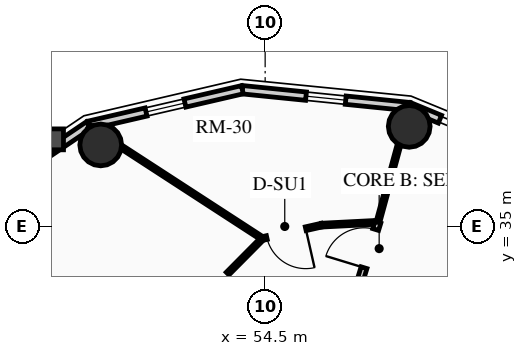
"""IFC4 building model, lengths in metres.
Left out: names, types, materials, properties, quantities, classifications, styles, units other than length and angle.
Written with IfcOpenShell. Run it as: python <this file> out.ifc"""

import sys

from ifc_helpers import new_model, si_unit, direction, frame, frame_2d, origin, origin_2d, place, context, subcontext, project, spatial, rectangle, circle, extrude, source, transform, mapped, element, fill, save


model = new_model("IFC4")
c1 = context("Model", 3, precision=1e-05, world=origin(), true_north=direction((0.0, 1.0)))
c2 = subcontext(c1, "Body", "Model", "MODEL_VIEW")
j1 = project(units=[si_unit("LENGTHUNIT", "METRE"), si_unit("PLANEANGLEUNIT", "RADIAN")], contexts=[c1])
p1 = place(None, origin())
s1 = spatial("IfcSite", under=j1, at=p1, CompositionType="ELEMENT")
p2 = place(p1, origin())
s2 = spatial("IfcBuilding", under=s1, at=p2, CompositionType="ELEMENT")
p3 = place(p2, frame((0.0, 0.0, 229.25)))
s3 = spatial("IfcBuildingStorey", under=s2, at=p3, CompositionType="ELEMENT", Elevation=229.25)
for number, where, z_axis, x_axis in (
    (1, (58.291, 37.635, 0.0), (0.0, 0.0, 1.0), (1.0, 0.0, 0.0)),
    (2, (50.173, 37.146, 0.0), (0.0, 0.0, 1.0), (1.0, 0.0, 0.0)),
):
    element("IfcColumn", number, at=place(p3, frame(where, z_axis=z_axis, x_axis=x_axis)), inside=s3, PredefinedType="USERDEFINED", context=c2, shape_type="SweptSolid", body=[
        extrude(circle(Radius=0.55, at=origin_2d()), origin(), (0.0, 0.0, 1.0), 3.2),
    ])
p4 = place(p3, frame((58.295, 38.155, 0.0), z_axis=(0.0, 0.0, 1.0), x_axis=(0.924515260676, -0.381145028536, 0.0)))
e3 = element("IfcWall", 3, at=p4, inside=s3, PredefinedType="SOLIDWALL", context=c2, shape_type="SweptSolid", body=[
    extrude(rectangle(XDim=0.87, YDim=0.22, at=frame_2d((0.435, 0.0))), origin(), (0.0, 0.0, 1.0), 2.612),
])
p5 = place(p3, frame((53.9, 38.599, 0.0), z_axis=(0.0, 0.0, 1.0), x_axis=(0.994929930991, -0.100570534541, 0.0)))
e4 = element("IfcWall", 4, at=p5, inside=s3, PredefinedType="SOLIDWALL", context=c2, shape_type="SweptSolid", body=[
    extrude(rectangle(XDim=4.418, YDim=0.22, at=frame_2d((2.209, 0.0))), origin(), (0.0, 0.0, 1.0), 2.612),
])
m1 = source(origin(), c2, "Body", "SweptSolid", [
    extrude(rectangle(XDim=1.05, YDim=1.3, at=frame_2d((0.525, 0.65))), frame((0.0, 0.12, 0.0), z_axis=(0.0, -1.0, 0.0), x_axis=(1.0, 0.0, 0.0)), (0.0, 0.0, 1.0), 0.24),
])
p6 = place(p5, frame((1.684, 0.0, 0.65)))
e5 = element("IfcOpeningElement", 5, at=p6, cuts=e4, PredefinedType="OPENING", context=c2, shape_type="MappedRepresentation", body=[
    mapped(m1, transform((0.0, 0.0, 0.0), x_axis=(1.0, 0.0, 0.0), y_axis=(0.0, 1.0, 0.0), z_axis=(0.0, 0.0, 1.0), scale=1.0)),
])
p7 = place(p3, frame((49.856, 37.663, 0.0), z_axis=(0.0, 0.0, 1.0), x_axis=(0.974249228678, 0.225473813158, 0.0)))
e6 = element("IfcWall", 6, at=p7, inside=s3, PredefinedType="SOLIDWALL", context=c2, shape_type="SweptSolid", body=[
    extrude(rectangle(XDim=4.15, YDim=0.22, at=frame_2d((2.075, 0.0))), origin(), (0.0, 0.0, 1.0), 2.612),
])
p8 = place(p7, frame((1.55, 0.0, 0.65)))
e7 = element("IfcOpeningElement", 7, at=p8, cuts=e6, PredefinedType="OPENING", context=c2, shape_type="MappedRepresentation", body=[
    mapped(m1, transform((0.0, 0.0, 0.0), x_axis=(1.0, 0.0, 0.0), y_axis=(0.0, 1.0, 0.0), z_axis=(0.0, 0.0, 1.0), scale=1.0)),
])
p9 = place(p3, frame((46.561, 35.439, 0.0), z_axis=(0.0, 0.0, 1.0), x_axis=(0.828833723692, 0.559495003079, 0.0)))
e8 = element("IfcWall", 8, at=p9, inside=s3, PredefinedType="SOLIDWALL", context=c2, shape_type="SweptSolid", body=[
    extrude(rectangle(XDim=3.976, YDim=0.22, at=frame_2d((1.988, 0.0))), origin(), (0.0, 0.0, 1.0), 2.612),
])
p10 = place(p3, frame((57.467, 35.111, 0.0), z_axis=(0.0, 0.0, 1.0), x_axis=(-0.998691757323, -0.051134859488, 0.0)))
e9 = element("IfcWall", 9, at=p10, inside=s3, PredefinedType="MOVABLE", context=c2, shape_type="SweptSolid", body=[
    extrude(rectangle(XDim=1.485, YDim=0.1, at=frame_2d((0.742, 0.0))), origin(), (0.0, 0.0, 1.0), 2.612),
])
p11 = place(p3, frame((55.984, 35.035, 0.0), z_axis=(0.0, 0.0, 1.0), x_axis=(-0.975290305708, -0.22092718165, 0.0)))
e10 = element("IfcWall", 10, at=p11, inside=s3, PredefinedType="MOVABLE", context=c2, shape_type="SweptSolid", body=[
    extrude(rectangle(XDim=1.597, YDim=0.1, at=frame_2d((0.798, 0.0))), origin(), (0.0, 0.0, 1.0), 2.545),
])
m2 = source(origin(), c2, "Body", "SweptSolid", [
    extrude(rectangle(XDim=1.05, YDim=2.015, at=frame_2d((0.525, 1.007))), frame((0.0, 0.06, 0.0), z_axis=(0.0, -1.0, 0.0), x_axis=(1.0, 0.0, 0.0)), (0.0, 0.0, 1.0), 0.12),
])
p12 = place(p11, frame((0.427, 0.0, 0.0)))
e11 = element("IfcOpeningElement", 11, at=p12, cuts=e10, PredefinedType="OPENING", context=c2, shape_type="MappedRepresentation", body=[
    mapped(m2, transform((0.0, 0.0, 0.0), x_axis=(1.0, 0.0, 0.0), y_axis=(0.0, 1.0, 0.0), z_axis=(0.0, 0.0, 1.0), scale=1.0)),
])
p13 = place(p3, frame((54.427, 34.683, 0.0), z_axis=(0.0, 0.0, 1.0), x_axis=(-0.704178989986, -0.710022499687, 0.0)))
e12 = element("IfcWall", 12, at=p13, inside=s3, PredefinedType="MOVABLE", context=c2, shape_type="SweptSolid", body=[
    extrude(rectangle(XDim=3.384, YDim=0.1, at=frame_2d((1.692, 0.0))), origin(), (0.0, 0.0, 1.0), 2.612),
])
p14 = place(p13, frame((1.298, 0.0, 0.0)))
e13 = element("IfcOpeningElement", 13, at=p14, cuts=e12, PredefinedType="OPENING", context=c2, shape_type="MappedRepresentation", body=[
    mapped(m2, transform((0.0, 0.0, 0.0), x_axis=(1.0, 0.0, 0.0), y_axis=(0.0, 1.0, 0.0), z_axis=(0.0, 0.0, 1.0), scale=1.0)),
])
p15 = place(p3, frame((57.467, 35.111, 0.0), z_axis=(0.0, 0.0, 1.0), x_axis=(0.263354670488, 0.964699081337, 0.0)))
e14 = element("IfcWall", 14, at=p15, inside=s3, PredefinedType="MOVABLE", context=c2, shape_type="SweptSolid", body=[
    extrude(rectangle(XDim=3.134, YDim=0.1, at=frame_2d((1.567, 0.0))), origin(), (0.0, 0.0, 1.0), 2.612),
])
p16 = place(p3, frame((54.427, 34.683, 0.0), z_axis=(0.0, 0.0, 1.0), x_axis=(-0.83860663594, 0.544737469023, 0.0)))
e15 = element("IfcWall", 15, at=p16, inside=s3, PredefinedType="MOVABLE", context=c2, shape_type="SweptSolid", body=[
    extrude(rectangle(XDim=5.439, YDim=0.1, at=frame_2d((2.72, 0.0))), origin(), (0.0, 0.0, 1.0), 2.612),
])
p17 = place(p3, frame((56.828, 33.021, 0.0), z_axis=(0.0, 0.0, 1.0), x_axis=(0.292139093972, 0.956375841274, 0.0)))
e16 = element("IfcWall", 16, at=p17, inside=s3, PredefinedType="PARTITIONING", context=c2, shape_type="SweptSolid", body=[
    extrude(rectangle(XDim=2.186, YDim=0.16, at=frame_2d((1.093, 0.0))), origin(), (0.0, 0.0, 1.0), 2.545),
])
m3 = source(origin(), c2, "Body", "SweptSolid", [
    extrude(rectangle(XDim=1.05, YDim=2.015, at=frame_2d((0.525, 1.007))), frame((0.0, 0.09, 0.0), z_axis=(0.0, -1.0, 0.0), x_axis=(1.0, 0.0, 0.0)), (0.0, 0.0, 1.0), 0.18),
])
p18 = place(p17, frame((0.936, 0.0, 0.0)))
e17 = element("IfcOpeningElement", 17, at=p18, cuts=e16, PredefinedType="OPENING", context=c2, shape_type="MappedRepresentation", body=[
    mapped(m3, transform((0.0, 0.0, 0.0), x_axis=(1.0, 0.0, 0.0), y_axis=(0.0, 1.0, 0.0), z_axis=(0.0, 0.0, 1.0), scale=1.0)),
])
m4 = source(origin(), c2, "Body", "SweptSolid", [
    extrude(rectangle(XDim=1.05, YDim=1.3, at=frame_2d((0.525, 0.65))), frame((0.0, 0.03, 0.0), z_axis=(0.0, -1.0, 0.0), x_axis=(1.0, 0.0, 0.0)), (0.0, 0.0, 1.0), 0.06),
])
p19 = place(p6, origin())
e18 = element("IfcWindow", 18, at=p19, inside=s3, PartitioningType="SINGLE_PANEL", PredefinedType="WINDOW", context=c2, shape_type="MappedRepresentation", body=[
    mapped(m4, transform((0.0, 0.0, 0.0), x_axis=(1.0, 0.0, 0.0), y_axis=(0.0, 1.0, 0.0), z_axis=(0.0, 0.0, 1.0), scale=1.0)),
])
fill(e5, e18)
p20 = place(p8, origin())
e19 = element("IfcWindow", 19, at=p20, inside=s3, PartitioningType="SINGLE_PANEL", PredefinedType="WINDOW", context=c2, shape_type="MappedRepresentation", body=[
    mapped(m4, transform((0.0, 0.0, 0.0), x_axis=(1.0, 0.0, 0.0), y_axis=(0.0, 1.0, 0.0), z_axis=(0.0, 0.0, 1.0), scale=1.0)),
])
fill(e7, e19)
m5 = source(origin(), c2, "Body", "SweptSolid", [
    extrude(rectangle(XDim=1.05, YDim=2.015, at=frame_2d((0.525, 1.007))), frame((0.0, 0.025, 0.0), z_axis=(0.0, -1.0, 0.0), x_axis=(1.0, 0.0, 0.0)), (0.0, 0.0, 1.0), 0.05),
])
p21 = place(p18, origin())
e20 = element("IfcDoor", 20, at=p21, inside=s3, OperationType="SINGLE_SWING_LEFT", PredefinedType="DOOR", context=c2, shape_type="MappedRepresentation", body=[
    mapped(m5, transform((0.0, 0.0, 0.0), x_axis=(1.0, 0.0, 0.0), y_axis=(0.0, 1.0, 0.0), z_axis=(0.0, 0.0, 1.0), scale=1.0)),
])
fill(e17, e20)
p22 = place(p12, origin())
e21 = element("IfcDoor", 21, at=p22, inside=s3, OperationType="SINGLE_SWING_LEFT", PredefinedType="DOOR", context=c2, shape_type="MappedRepresentation", body=[
    mapped(m5, transform((0.0, 0.0, 0.0), x_axis=(1.0, 0.0, 0.0), y_axis=(0.0, 1.0, 0.0), z_axis=(0.0, 0.0, 1.0), scale=1.0)),
])
fill(e11, e21)
p23 = place(p14, origin())
e22 = element("IfcDoor", 22, at=p23, inside=s3, OperationType="SINGLE_SWING_RIGHT", PredefinedType="DOOR", context=c2, shape_type="MappedRepresentation", body=[
    mapped(m5, transform((0.0, 0.0, 0.0), x_axis=(1.0, 0.0, 0.0), y_axis=(0.0, 1.0, 0.0), z_axis=(0.0, 0.0, 1.0), scale=1.0)),
])
fill(e13, e22)
save(model, sys.argv[1])
